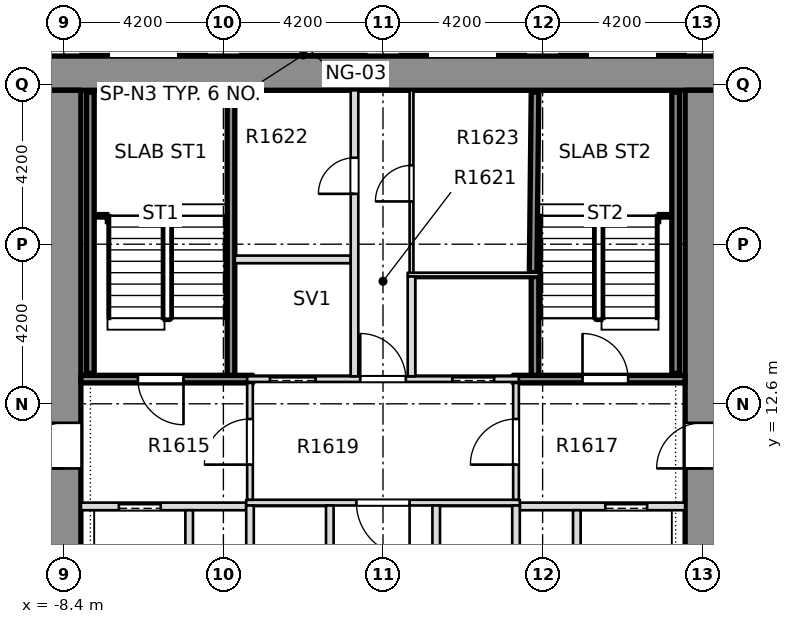
"""IFC4 building model, lengths in metres.
Left out: names, types, materials, properties, quantities, classifications, styles, units other than length and angle.
Written with IfcOpenShell. Run it as: python <this file> out.ifc"""

import sys

from ifc_helpers import new_model, si_unit, direction, frame, frame_2d, origin, place, context, subcontext, project, spatial, rectangle, extrude, element, fill, save


model = new_model("IFC4")
c1 = context("Model", 3, precision=1e-05, world=origin(), true_north=direction((0.0, 1.0)))
c2 = subcontext(c1, "Body", "Model", "MODEL_VIEW")
j1 = project(units=[si_unit("LENGTHUNIT", "METRE"), si_unit("PLANEANGLEUNIT", "RADIAN")], contexts=[c1])
p1 = place(None, origin())
s1 = spatial("IfcSite", under=j1, at=p1, CompositionType="ELEMENT")
p2 = place(p1, origin())
s2 = spatial("IfcBuilding", under=s1, at=p2, CompositionType="ELEMENT")
p3 = place(p2, frame((0.0, 0.0, 69.0)))
s3 = spatial("IfcBuildingStorey", under=s2, at=p3, CompositionType="ELEMENT", Elevation=69.0)
p4 = place(p3, frame((-11.7, 21.3, -0.32), z_axis=(0.0, 0.0, 1.0), x_axis=(1.0, 0.0, 0.0)))
e1 = element("IfcWall", 1, at=p4, inside=s3, PredefinedType="SOLIDWALL", context=c2, shape_type="SweptSolid", body=[
    extrude(rectangle(XDim=23.4, YDim=0.9, at=frame_2d((11.7, 0.0))), origin(), (0.0, 0.0, 1.0), 3.45),
])
p5 = place(p3, frame((-8.4, -7.5, -0.32), z_axis=(0.0, 0.0, 1.0), x_axis=(0.0, 1.0, 0.0)))
e2 = element("IfcWall", 2, at=p5, inside=s3, PredefinedType="SHEAR", context=c2, shape_type="SweptSolid", body=[
    extrude(rectangle(XDim=28.35, YDim=0.9, at=frame_2d((14.175, 0.0))), origin(), (0.0, 0.0, 1.0), 3.45),
])
p6 = place(p5, frame((18.4, 0.0, 0.32)))
e3 = element("IfcOpeningElement", 3, at=p6, cuts=e2, PredefinedType="OPENING", context=c2, shape_type="SweptSolid", body=[
    extrude(rectangle(XDim=1.2, YDim=2.1, at=frame_2d((0.6, 1.05))), frame((0.0, 0.46, 0.0), z_axis=(0.0, -1.0, 0.0), x_axis=(1.0, 0.0, 0.0)), (0.0, 0.0, 1.0), 0.92),
])
p7 = place(p3, frame((8.4, -7.5, -0.32), z_axis=(0.0, 0.0, 1.0), x_axis=(0.0, 1.0, 0.0)))
e4 = element("IfcWall", 4, at=p7, inside=s3, PredefinedType="SHEAR", context=c2, shape_type="SweptSolid", body=[
    extrude(rectangle(XDim=28.35, YDim=0.9, at=frame_2d((14.175, 0.0))), origin(), (0.0, 0.0, 1.0), 3.45),
])
p8 = place(p7, frame((18.4, 0.0, 0.32)))
e5 = element("IfcOpeningElement", 5, at=p8, cuts=e4, PredefinedType="OPENING", context=c2, shape_type="SweptSolid", body=[
    extrude(rectangle(XDim=1.2, YDim=2.1, at=frame_2d((0.6, 1.05))), frame((0.0, 0.46, 0.0), z_axis=(0.0, -1.0, 0.0), x_axis=(1.0, 0.0, 0.0)), (0.0, 0.0, 1.0), 0.92),
])
p9 = place(p3, frame((-7.949, 9.9, 0.0), z_axis=(0.0, 0.0, 1.0), x_axis=(1.0, 0.0, 0.0)))
e6 = element("IfcWall", 6, at=p9, inside=s3, PredefinedType="PARTITIONING", context=c2, shape_type="SweptSolid", body=[
    extrude(rectangle(XDim=4.349, YDim=0.2, at=frame_2d((2.174, 0.0))), origin(), (0.0, 0.0, 1.0), 3.13),
])
p10 = place(p9, frame((0.999, 0.0, 0.0)))
e7 = element("IfcOpeningElement", 7, at=p10, cuts=e6, PredefinedType="OPENING", context=c2, shape_type="SweptSolid", body=[
    extrude(rectangle(XDim=1.1, YDim=2.1, at=frame_2d((0.55, 1.05))), frame((0.0, 0.11, 0.0), z_axis=(0.0, -1.0, 0.0), x_axis=(1.0, 0.0, 0.0)), (0.0, 0.0, 1.0), 0.22),
])
p11 = place(p3, frame((3.6, 9.9, 0.0), z_axis=(0.0, 0.0, 1.0), x_axis=(1.0, 0.0, 0.0)))
e8 = element("IfcWall", 8, at=p11, inside=s3, PredefinedType="PARTITIONING", context=c2, shape_type="SweptSolid", body=[
    extrude(rectangle(XDim=4.349, YDim=0.2, at=frame_2d((2.174, 0.0))), origin(), (0.0, 0.0, 1.0), 3.13),
])
p12 = place(p11, frame((2.25, 0.0, 0.0)))
e9 = element("IfcOpeningElement", 9, at=p12, cuts=e8, PredefinedType="OPENING", context=c2, shape_type="SweptSolid", body=[
    extrude(rectangle(XDim=1.1, YDim=2.1, at=frame_2d((0.55, 1.05))), frame((0.0, 0.11, 0.0), z_axis=(0.0, -1.0, 0.0), x_axis=(1.0, 0.0, 0.0)), (0.0, 0.0, 1.0), 0.22),
])
p13 = place(p3, frame((-3.6, 10.0, 0.0), z_axis=(0.0, 0.0, 1.0), x_axis=(1.0, 0.0, 0.0)))
e10 = element("IfcWall", 10, at=p13, inside=s3, PredefinedType="PARTITIONING", context=c2, shape_type="SweptSolid", body=[
    extrude(rectangle(XDim=7.2, YDim=0.15, at=frame_2d((3.6, 0.0))), origin(), (0.0, 0.0, 1.0), 3.13),
])
p14 = place(p13, frame((2.9, 0.0, 0.0)))
e11 = element("IfcOpeningElement", 11, at=p14, cuts=e10, PredefinedType="OPENING", context=c2, shape_type="SweptSolid", body=[
    extrude(rectangle(XDim=1.4, YDim=2.1, at=frame_2d((0.7, 1.05))), frame((0.0, 0.085, 0.0), z_axis=(0.0, -1.0, 0.0), x_axis=(1.0, 0.0, 0.0)), (0.0, 0.0, 1.0), 0.17),
])
p15 = place(p3, frame((-7.949, 13.25, 0.0), z_axis=(0.0, 0.0, 1.0), x_axis=(1.0, 0.0, 0.0)))
e12 = element("IfcWall", 12, at=p15, inside=s3, PredefinedType="SOLIDWALL", context=c2, shape_type="SweptSolid", body=[
    extrude(rectangle(XDim=4.524, YDim=0.2, at=frame_2d((2.262, 0.0))), origin(), (0.0, 0.0, 1.0), 3.13),
])
p16 = place(p15, frame((1.499, 0.0, 0.0)))
e13 = element("IfcOpeningElement", 13, at=p16, cuts=e12, PredefinedType="OPENING", context=c2, shape_type="SweptSolid", body=[
    extrude(rectangle(XDim=1.2, YDim=2.1, at=frame_2d((0.6, 1.05))), frame((0.0, 0.11, 0.0), z_axis=(0.0, -1.0, 0.0), x_axis=(1.0, 0.0, 0.0)), (0.0, 0.0, 1.0), 0.22),
])
p17 = place(p3, frame((-3.575, 13.25, 0.0), z_axis=(0.0, 0.0, 1.0), x_axis=(1.0, 0.0, 0.0)))
e14 = element("IfcWall", 14, at=p17, inside=s3, PredefinedType="PARTITIONING", context=c2, shape_type="SweptSolid", body=[
    extrude(rectangle(XDim=7.15, YDim=0.15, at=frame_2d((3.575, 0.0))), origin(), (0.0, 0.0, 1.0), 3.13),
])
p18 = place(p17, frame((0.6, 0.0, 0.0)))
e15 = element("IfcOpeningElement", 15, at=p18, cuts=e14, PredefinedType="OPENING", context=c2, shape_type="SweptSolid", body=[
    extrude(rectangle(XDim=1.2, YDim=2.1, at=frame_2d((0.6, 1.05))), frame((0.0, 0.085, 0.0), z_axis=(0.0, -1.0, 0.0), x_axis=(1.0, 0.0, 0.0)), (0.0, 0.0, 1.0), 0.17),
])
p19 = place(p17, frame((5.4, 0.0, 0.0)))
e16 = element("IfcOpeningElement", 16, at=p19, cuts=e14, PredefinedType="OPENING", context=c2, shape_type="SweptSolid", body=[
    extrude(rectangle(XDim=1.1, YDim=2.1, at=frame_2d((0.55, 1.05))), frame((0.0, 0.085, 0.0), z_axis=(0.0, -1.0, 0.0), x_axis=(1.0, 0.0, 0.0)), (0.0, 0.0, 1.0), 0.17),
])
p20 = place(p17, frame((2.975, 0.0, 0.0)))
e17 = element("IfcOpeningElement", 17, at=p20, cuts=e14, PredefinedType="OPENING", context=c2, shape_type="SweptSolid", body=[
    extrude(rectangle(XDim=1.2, YDim=2.1, at=frame_2d((0.6, 1.05))), frame((0.0, 0.085, 0.0), z_axis=(0.0, -1.0, 0.0), x_axis=(1.0, 0.0, 0.0)), (0.0, 0.0, 1.0), 0.17),
])
p21 = place(p3, frame((3.425, 13.25, 0.0), z_axis=(0.0, 0.0, 1.0), x_axis=(1.0, 0.0, 0.0)))
e18 = element("IfcWall", 18, at=p21, inside=s3, PredefinedType="SOLIDWALL", context=c2, shape_type="SweptSolid", body=[
    extrude(rectangle(XDim=4.524, YDim=0.2, at=frame_2d((2.262, 0.0))), origin(), (0.0, 0.0, 1.0), 3.13),
])
p22 = place(p21, frame((1.825, 0.0, 0.0)))
e19 = element("IfcOpeningElement", 19, at=p22, cuts=e18, PredefinedType="OPENING", context=c2, shape_type="SweptSolid", body=[
    extrude(rectangle(XDim=1.2, YDim=2.1, at=frame_2d((0.6, 1.05))), frame((0.0, 0.11, 0.0), z_axis=(0.0, -1.0, 0.0), x_axis=(1.0, 0.0, 0.0)), (0.0, 0.0, 1.0), 0.22),
])
p23 = place(p3, frame((0.65, 16.0, 0.0), z_axis=(0.0, 0.0, 1.0), x_axis=(1.0, 0.0, 0.0)))
e20 = element("IfcWall", 20, at=p23, inside=s3, PredefinedType="PARTITIONING", context=c2, shape_type="SweptSolid", body=[
    extrude(rectangle(XDim=3.45, YDim=0.1, at=frame_2d((1.725, 0.0))), origin(), (0.0, 0.0, 1.0), 3.13),
])
p24 = place(p3, frame((-3.9, 16.4, 0.0), z_axis=(0.0, 0.0, 1.0), x_axis=(1.0, 0.0, 0.0)))
e21 = element("IfcWall", 21, at=p24, inside=s3, PredefinedType="PARTITIONING", context=c2, shape_type="SweptSolid", body=[
    extrude(rectangle(XDim=3.05, YDim=0.2, at=frame_2d((1.525, 0.0))), origin(), (0.0, 0.0, 1.0), 3.13),
])
p25 = place(p3, frame((-5.1, 7.075, 0.0), z_axis=(0.0, 0.0, 1.0), x_axis=(0.0, 1.0, 0.0)))
e22 = element("IfcWall", 22, at=p25, inside=s3, PredefinedType="PARTITIONING", context=c2, shape_type="SweptSolid", body=[
    extrude(rectangle(XDim=2.725, YDim=0.2, at=frame_2d((1.363, 0.0))), origin(), (0.0, 0.0, 1.0), 3.13),
])
p26 = place(p3, frame((-4.0, 13.35, 0.0), z_axis=(0.0, 0.0, 1.0), x_axis=(0.0, 1.0, 0.0)))
e23 = element("IfcWall", 23, at=p26, inside=s3, PredefinedType="SOLIDWALL", context=c2, shape_type="SweptSolid", body=[
    extrude(rectangle(XDim=7.499, YDim=0.2, at=frame_2d((3.75, 0.0))), origin(), (0.0, 0.0, 1.0), 3.13),
])
p27 = place(p3, frame((-3.5, 7.075, 0.0), z_axis=(0.0, 0.0, 1.0), x_axis=(0.0, 1.0, 0.0)))
e24 = element("IfcWall", 24, at=p27, inside=s3, PredefinedType="PARTITIONING", context=c2, shape_type="SweptSolid", body=[
    extrude(rectangle(XDim=2.85, YDim=0.2, at=frame_2d((1.425, 0.0))), origin(), (0.0, 0.0, 1.0), 3.13),
])
p28 = place(p3, frame((-3.5, 10.075, 0.0), z_axis=(0.0, 0.0, 1.0), x_axis=(0.0, 1.0, 0.0)))
e25 = element("IfcWall", 25, at=p28, inside=s3, PredefinedType="PARTITIONING", context=c2, shape_type="SweptSolid", body=[
    extrude(rectangle(XDim=3.075, YDim=0.15, at=frame_2d((1.538, 0.0))), origin(), (0.0, 0.0, 1.0), 3.13),
])
p29 = place(p28, frame((0.925, 0.0, 0.0)))
e26 = element("IfcOpeningElement", 26, at=p29, cuts=e25, PredefinedType="OPENING", context=c2, shape_type="SweptSolid", body=[
    extrude(rectangle(XDim=1.2, YDim=2.1, at=frame_2d((0.6, 1.05))), frame((0.0, 0.085, 0.0), z_axis=(0.0, -1.0, 0.0), x_axis=(1.0, 0.0, 0.0)), (0.0, 0.0, 1.0), 0.17),
])
p30 = place(p3, frame((-1.4, 7.075, 0.0), z_axis=(0.0, 0.0, 1.0), x_axis=(0.0, 1.0, 0.0)))
e27 = element("IfcWall", 27, at=p30, inside=s3, PredefinedType="PARTITIONING", context=c2, shape_type="SweptSolid", body=[
    extrude(rectangle(XDim=2.85, YDim=0.2, at=frame_2d((1.425, 0.0))), origin(), (0.0, 0.0, 1.0), 3.13),
])
p31 = place(p3, frame((-0.75, 13.325, 0.0), z_axis=(0.0, 0.0, 1.0), x_axis=(0.0, 1.0, 0.0)))
e28 = element("IfcWall", 28, at=p31, inside=s3, PredefinedType="PARTITIONING", context=c2, shape_type="SweptSolid", body=[
    extrude(rectangle(XDim=7.524, YDim=0.2, at=frame_2d((3.762, 0.0))), origin(), (0.0, 0.0, 1.0), 3.13),
])
p32 = place(p31, frame((4.8, 0.0, 0.0)))
e29 = element("IfcOpeningElement", 29, at=p32, cuts=e28, PredefinedType="OPENING", context=c2, shape_type="SweptSolid", body=[
    extrude(rectangle(XDim=0.95, YDim=2.1, at=frame_2d((0.475, 1.05))), frame((0.0, 0.11, 0.0), z_axis=(0.0, -1.0, 0.0), x_axis=(1.0, 0.0, 0.0)), (0.0, 0.0, 1.0), 0.22),
])
p33 = place(p3, frame((0.75, 13.325, 0.0), z_axis=(0.0, 0.0, 1.0), x_axis=(0.0, 1.0, 0.0)))
e30 = element("IfcWall", 30, at=p33, inside=s3, PredefinedType="PARTITIONING", context=c2, shape_type="SweptSolid", body=[
    extrude(rectangle(XDim=2.625, YDim=0.2, at=frame_2d((1.312, 0.0))), origin(), (0.0, 0.0, 1.0), 3.13),
])
p34 = place(p3, frame((0.75, 16.05, 0.0), z_axis=(0.0, 0.0, 1.0), x_axis=(0.0, 1.0, 0.0)))
e31 = element("IfcWall", 31, at=p34, inside=s3, PredefinedType="PARTITIONING", context=c2, shape_type="SweptSolid", body=[
    extrude(rectangle(XDim=4.799, YDim=0.1, at=frame_2d((2.399, 0.0))), origin(), (0.0, 0.0, 1.0), 3.13),
])
p35 = place(p34, frame((1.875, 0.0, 0.0)))
e32 = element("IfcOpeningElement", 32, at=p35, cuts=e31, PredefinedType="OPENING", context=c2, shape_type="SweptSolid", body=[
    extrude(rectangle(XDim=0.95, YDim=2.1, at=frame_2d((0.475, 1.05))), frame((0.0, 0.06, 0.0), z_axis=(0.0, -1.0, 0.0), x_axis=(1.0, 0.0, 0.0)), (0.0, 0.0, 1.0), 0.12),
])
for number, where, z_axis, x_axis in (
    (33, (1.4, 7.075, 0.0), (0.0, 0.0, 1.0), (0.0, 1.0, 0.0)),
    (34, (3.5, 7.075, 0.0), (0.0, 0.0, 1.0), (0.0, 1.0, 0.0)),
):
    element("IfcWall", number, at=place(p3, frame(where, z_axis=z_axis, x_axis=x_axis)), inside=s3, PredefinedType="PARTITIONING", context=c2, shape_type="SweptSolid", body=[
        extrude(rectangle(XDim=2.85, YDim=0.2, at=frame_2d((1.425, 0.0))), origin(), (0.0, 0.0, 1.0), 3.13),
    ])
p36 = place(p3, frame((3.5, 10.075, 0.0), z_axis=(0.0, 0.0, 1.0), x_axis=(0.0, 1.0, 0.0)))
e35 = element("IfcWall", 35, at=p36, inside=s3, PredefinedType="PARTITIONING", context=c2, shape_type="SweptSolid", body=[
    extrude(rectangle(XDim=3.075, YDim=0.15, at=frame_2d((1.538, 0.0))), origin(), (0.0, 0.0, 1.0), 3.13),
])
p37 = place(p36, frame((0.925, 0.0, 0.0)))
e36 = element("IfcOpeningElement", 36, at=p37, cuts=e35, PredefinedType="OPENING", context=c2, shape_type="SweptSolid", body=[
    extrude(rectangle(XDim=1.2, YDim=2.1, at=frame_2d((0.6, 1.05))), frame((0.0, 0.085, 0.0), z_axis=(0.0, -1.0, 0.0), x_axis=(1.0, 0.0, 0.0)), (0.0, 0.0, 1.0), 0.17),
])
p38 = place(p3, frame((4.0, 13.35, 0.0), z_axis=(0.0, 0.0, 1.0), x_axis=(0.0, 1.0, 0.0)))
e37 = element("IfcWall", 37, at=p38, inside=s3, PredefinedType="SOLIDWALL", context=c2, shape_type="SweptSolid", body=[
    extrude(rectangle(XDim=2.6, YDim=0.2, at=frame_2d((1.3, 0.0))), origin(), (0.0, 0.0, 1.0), 3.13),
])
p39 = place(p3, frame((3.95, 16.05, 0.0), z_axis=(0.0, 0.0, 1.0), x_axis=(0.010538176883, 0.999944471872, 0.0)))
e38 = element("IfcWall", 38, at=p39, inside=s3, PredefinedType="SOLIDWALL", context=c2, shape_type="SweptSolid", body=[
    extrude(rectangle(XDim=4.749, YDim=0.2, at=frame_2d((2.375, 0.0))), origin(), (0.0, 0.0, 1.0), 3.13),
])
p40 = place(p3, frame((5.1, 7.075, 0.0), z_axis=(0.0, 0.0, 1.0), x_axis=(0.0, 1.0, 0.0)))
e39 = element("IfcWall", 39, at=p40, inside=s3, PredefinedType="PARTITIONING", context=c2, shape_type="SweptSolid", body=[
    extrude(rectangle(XDim=2.725, YDim=0.2, at=frame_2d((1.363, 0.0))), origin(), (0.0, 0.0, 1.0), 3.13),
])
for number, where, z_axis, x_axis in (
    (40, (-7.7, 13.4, 0.0), (0.0, 0.0, 1.0), (0.0, 1.0, 0.0)),
    (41, (7.7, 13.4, 0.0), (0.0, 0.0, 1.0), (0.0, 1.0, 0.0)),
):
    element("IfcWall", number, at=place(p3, frame(where, z_axis=z_axis, x_axis=x_axis)), inside=s3, PredefinedType="SOLIDWALL", context=c2, shape_type="SweptSolid", body=[
        extrude(rectangle(XDim=7.4, YDim=0.2, at=frame_2d((3.7, 0.0))), origin(), (0.0, 0.0, 1.0), 3.13),
    ])
p41 = place(p16, origin())
e42 = element("IfcDoor", 42, at=p41, inside=s3, OperationType="SINGLE_SWING_LEFT", PredefinedType="DOOR", context=c2, shape_type="SweptSolid", body=[
    extrude(rectangle(XDim=1.2, YDim=2.1, at=frame_2d((0.6, 1.05))), frame((0.0, 0.025, 0.0), z_axis=(0.0, -1.0, 0.0), x_axis=(1.0, 0.0, 0.0)), (0.0, 0.0, 1.0), 0.05),
])
fill(e13, e42)
p42 = place(p10, origin())
e43 = element("IfcDoor", 43, at=p42, inside=s3, OperationType="SLIDING_TO_RIGHT", PredefinedType="DOOR", context=c2, shape_type="SweptSolid", body=[
    extrude(rectangle(XDim=1.1, YDim=2.1, at=frame_2d((0.55, 1.05))), frame((0.0, 0.025, 0.0), z_axis=(0.0, -1.0, 0.0), x_axis=(1.0, 0.0, 0.0)), (0.0, 0.0, 1.0), 0.05),
])
fill(e7, e43)
p43 = place(p22, origin())
e44 = element("IfcDoor", 44, at=p43, inside=s3, OperationType="SINGLE_SWING_RIGHT", PredefinedType="DOOR", context=c2, shape_type="SweptSolid", body=[
    extrude(rectangle(XDim=1.2, YDim=2.1, at=frame_2d((0.6, 1.05))), frame((0.0, 0.025, 0.0), z_axis=(0.0, -1.0, 0.0), x_axis=(1.0, 0.0, 0.0)), (0.0, 0.0, 1.0), 0.05),
])
fill(e19, e44)
p44 = place(p12, origin())
e45 = element("IfcDoor", 45, at=p44, inside=s3, OperationType="SLIDING_TO_LEFT", PredefinedType="DOOR", context=c2, shape_type="SweptSolid", body=[
    extrude(rectangle(XDim=1.1, YDim=2.1, at=frame_2d((0.55, 1.05))), frame((0.0, 0.025, 0.0), z_axis=(0.0, -1.0, 0.0), x_axis=(1.0, 0.0, 0.0)), (0.0, 0.0, 1.0), 0.05),
])
fill(e9, e45)
p45 = place(p14, origin())
e46 = element("IfcDoor", 46, at=p45, inside=s3, OperationType="SINGLE_SWING_RIGHT", PredefinedType="DOOR", context=c2, shape_type="SweptSolid", body=[
    extrude(rectangle(XDim=1.4, YDim=2.1, at=frame_2d((0.7, 1.05))), frame((0.0, 0.025, 0.0), z_axis=(0.0, -1.0, 0.0), x_axis=(1.0, 0.0, 0.0)), (0.0, 0.0, 1.0), 0.05),
])
fill(e11, e46)
p46 = place(p18, origin())
e47 = element("IfcDoor", 47, at=p46, inside=s3, OperationType="SLIDING_TO_RIGHT", PredefinedType="DOOR", context=c2, shape_type="SweptSolid", body=[
    extrude(rectangle(XDim=1.2, YDim=2.1, at=frame_2d((0.6, 1.05))), frame((0.0, 0.025, 0.0), z_axis=(0.0, -1.0, 0.0), x_axis=(1.0, 0.0, 0.0)), (0.0, 0.0, 1.0), 0.05),
])
fill(e15, e47)
p47 = place(p19, origin())
e48 = element("IfcDoor", 48, at=p47, inside=s3, OperationType="SLIDING_TO_LEFT", PredefinedType="DOOR", context=c2, shape_type="SweptSolid", body=[
    extrude(rectangle(XDim=1.1, YDim=2.1, at=frame_2d((0.55, 1.05))), frame((0.0, 0.025, 0.0), z_axis=(0.0, -1.0, 0.0), x_axis=(1.0, 0.0, 0.0)), (0.0, 0.0, 1.0), 0.05),
])
fill(e16, e48)
p48 = place(p20, origin())
e49 = element("IfcDoor", 49, at=p48, inside=s3, OperationType="SINGLE_SWING_RIGHT", PredefinedType="DOOR", context=c2, shape_type="SweptSolid", body=[
    extrude(rectangle(XDim=1.2, YDim=2.1, at=frame_2d((0.6, 1.05))), frame((0.0, 0.025, 0.0), z_axis=(0.0, -1.0, 0.0), x_axis=(1.0, 0.0, 0.0)), (0.0, 0.0, 1.0), 0.05),
])
fill(e17, e49)
p49 = place(p32, origin())
e50 = element("IfcDoor", 50, at=p49, inside=s3, OperationType="SINGLE_SWING_RIGHT", PredefinedType="DOOR", context=c2, shape_type="SweptSolid", body=[
    extrude(rectangle(XDim=0.95, YDim=2.1, at=frame_2d((0.475, 1.05))), frame((0.0, 0.025, 0.0), z_axis=(0.0, -1.0, 0.0), x_axis=(1.0, 0.0, 0.0)), (0.0, 0.0, 1.0), 0.05),
])
fill(e29, e50)
p50 = place(p35, origin())
e51 = element("IfcDoor", 51, at=p50, inside=s3, OperationType="SINGLE_SWING_LEFT", PredefinedType="DOOR", context=c2, shape_type="SweptSolid", body=[
    extrude(rectangle(XDim=0.95, YDim=2.1, at=frame_2d((0.475, 1.05))), frame((0.0, 0.025, 0.0), z_axis=(0.0, -1.0, 0.0), x_axis=(1.0, 0.0, 0.0)), (0.0, 0.0, 1.0), 0.05),
])
fill(e32, e51)
p51 = place(p29, origin())
e52 = element("IfcDoor", 52, at=p51, inside=s3, OperationType="SINGLE_SWING_RIGHT", PredefinedType="DOOR", context=c2, shape_type="SweptSolid", body=[
    extrude(rectangle(XDim=1.2, YDim=2.1, at=frame_2d((0.6, 1.05))), frame((0.0, 0.025, 0.0), z_axis=(0.0, -1.0, 0.0), x_axis=(1.0, 0.0, 0.0)), (0.0, 0.0, 1.0), 0.05),
])
fill(e26, e52)
p52 = place(p37, origin())
e53 = element("IfcDoor", 53, at=p52, inside=s3, OperationType="SINGLE_SWING_LEFT", PredefinedType="DOOR", context=c2, shape_type="SweptSolid", body=[
    extrude(rectangle(XDim=1.2, YDim=2.1, at=frame_2d((0.6, 1.05))), frame((0.0, 0.025, 0.0), z_axis=(0.0, -1.0, 0.0), x_axis=(1.0, 0.0, 0.0)), (0.0, 0.0, 1.0), 0.05),
])
fill(e36, e53)
p53 = place(p6, origin())
e54 = element("IfcDoor", 54, at=p53, inside=s3, OperationType="SINGLE_SWING_LEFT", PredefinedType="DOOR", context=c2, shape_type="SweptSolid", body=[
    extrude(rectangle(XDim=1.2, YDim=2.1, at=frame_2d((0.6, 1.05))), frame((0.0, 0.025, 0.0), z_axis=(0.0, -1.0, 0.0), x_axis=(1.0, 0.0, 0.0)), (0.0, 0.0, 1.0), 0.05),
])
fill(e3, e54)
p54 = place(p8, origin())
e55 = element("IfcDoor", 55, at=p54, inside=s3, OperationType="SINGLE_SWING_LEFT", PredefinedType="DOOR", context=c2, shape_type="SweptSolid", body=[
    extrude(rectangle(XDim=1.2, YDim=2.1, at=frame_2d((0.6, 1.05))), frame((0.0, 0.025, 0.0), z_axis=(0.0, -1.0, 0.0), x_axis=(1.0, 0.0, 0.0)), (0.0, 0.0, 1.0), 0.05),
])
fill(e5, e55)
save(model, sys.argv[1])
